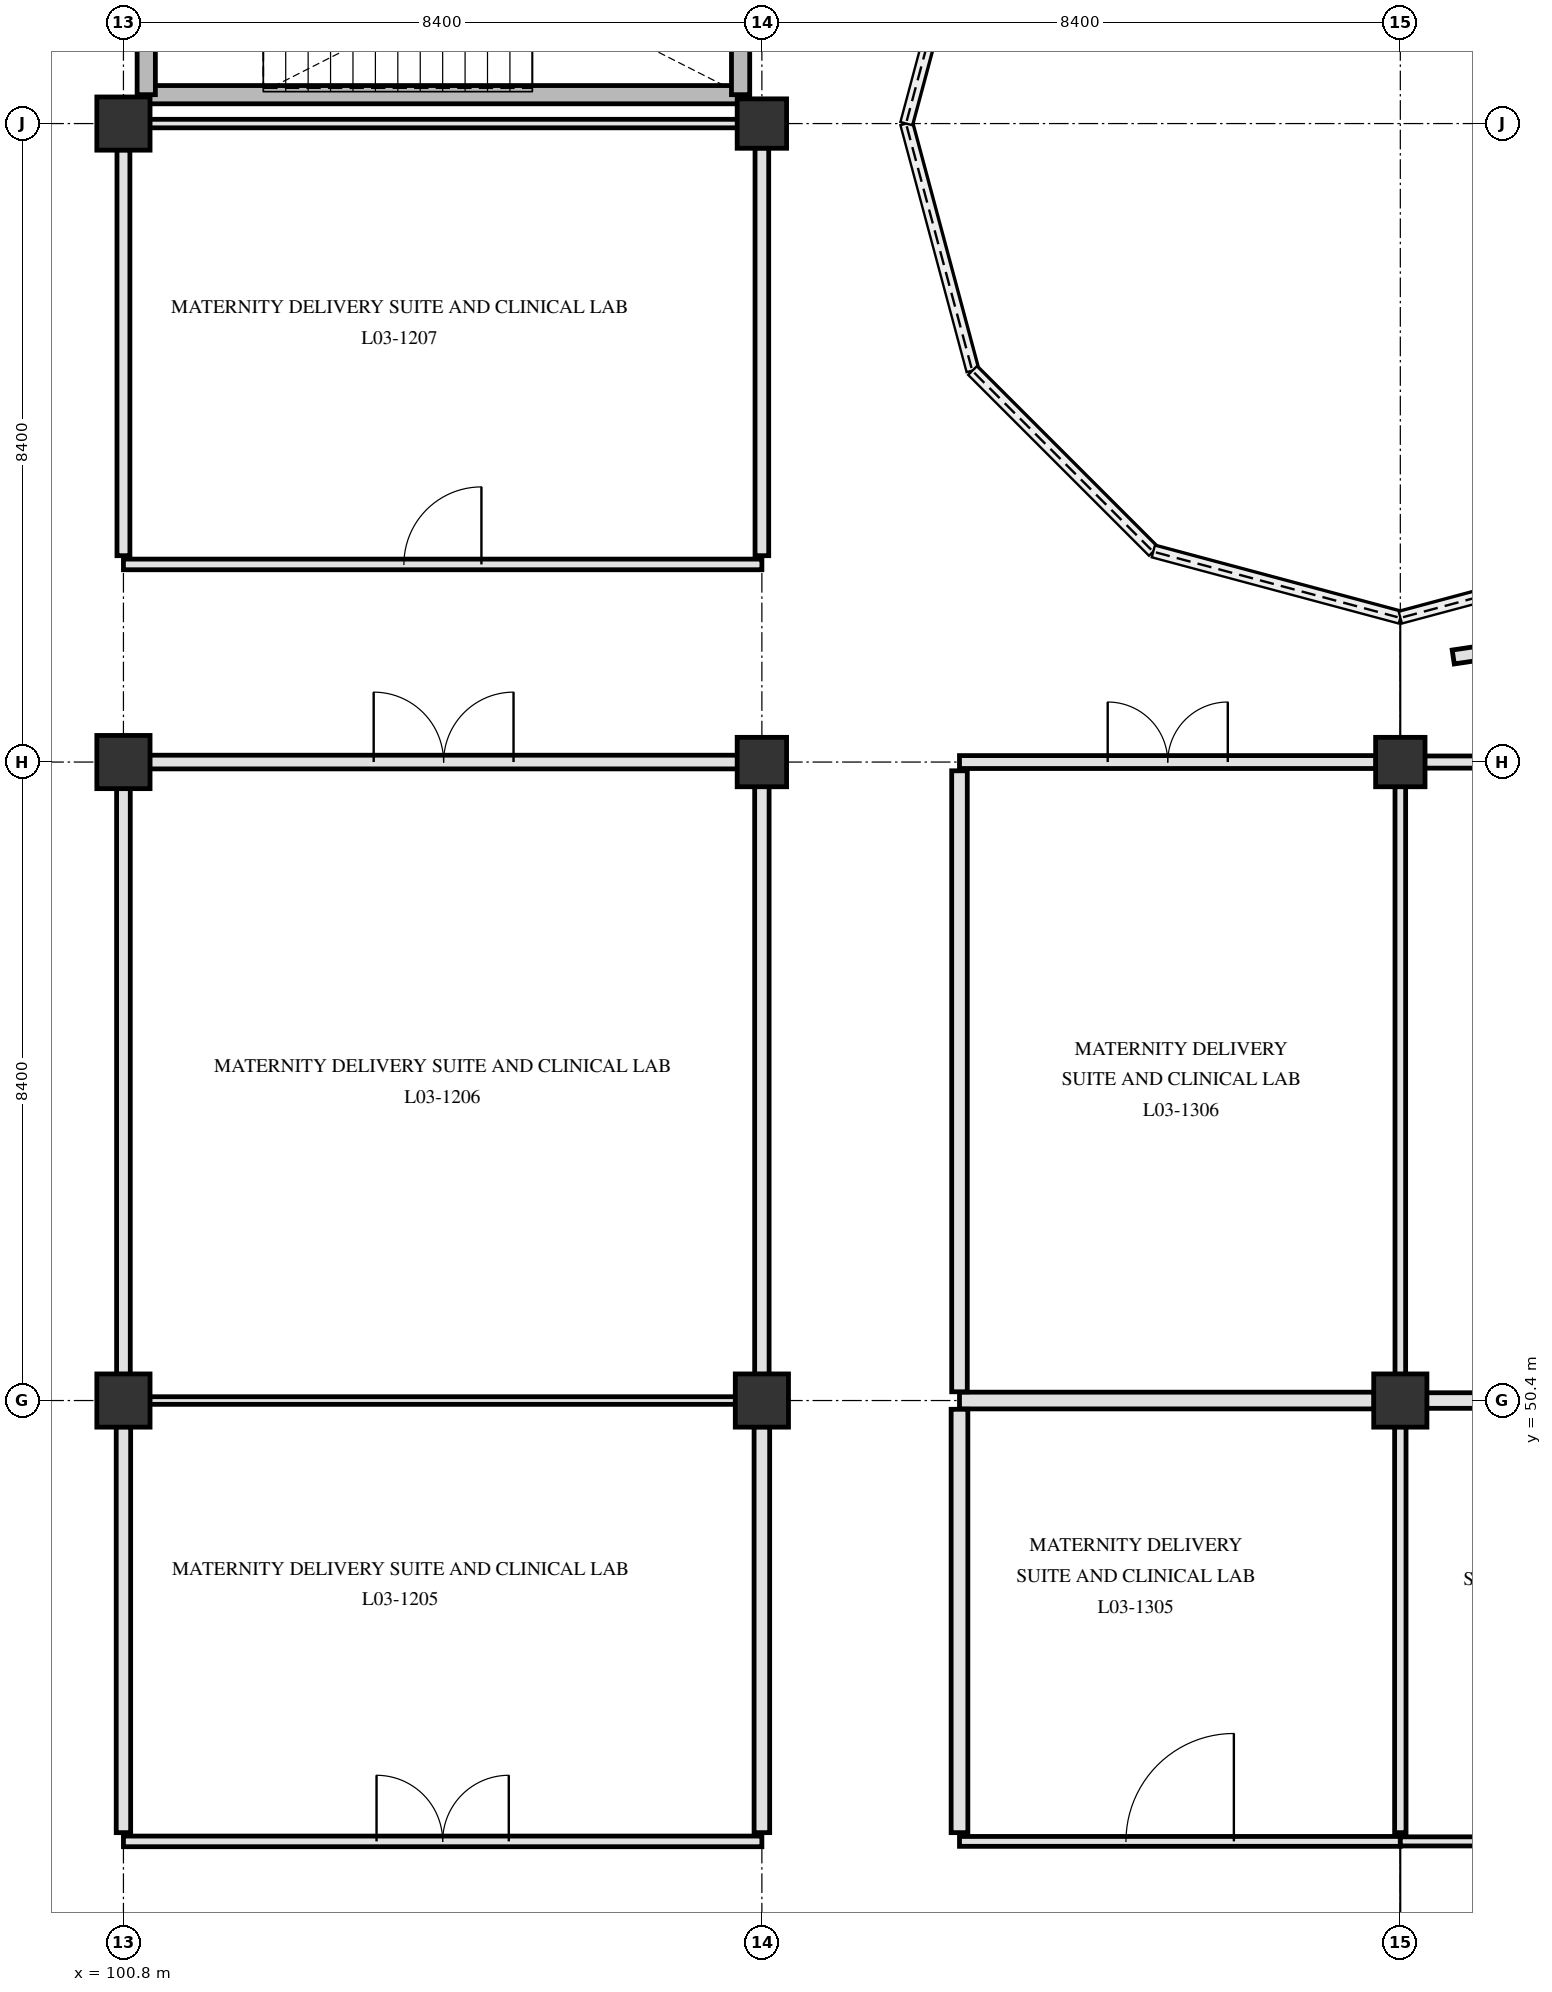
"""IFC4 building model, lengths in metres.
Left out: names, types, materials, properties, quantities, classifications, styles, units other than length and angle.
Written with IfcOpenShell. Run it as: python <this file> out.ifc"""

import sys

from ifc_helpers import new_model, si_unit, direction, frame, frame_2d, origin, origin_2d, place, context, subcontext, project, spatial, rectangle, circle, extrude, element, fill, save


model = new_model("IFC4")
c1 = context("Model", 3, precision=1e-05, world=origin(), true_north=direction((0.0, 1.0)))
c2 = subcontext(c1, "Body", "Model", "MODEL_VIEW")
j1 = project(units=[si_unit("LENGTHUNIT", "METRE"), si_unit("PLANEANGLEUNIT", "RADIAN")], contexts=[c1])
p1 = place(None, origin())
s1 = spatial("IfcSite", under=j1, at=p1, CompositionType="ELEMENT")
p2 = place(p1, origin())
s2 = spatial("IfcBuilding", under=s1, at=p2, CompositionType="ELEMENT")
p3 = place(p2, frame((0.0, 0.0, 14.4)))
s3 = spatial("IfcBuildingStorey", under=s2, at=p3, CompositionType="ELEMENT", Elevation=14.4)
for number, where, z_axis, x_axis in (
    (1, (100.8, 50.4, 0.0), (0.0, 0.0, 1.0), (1.0, 0.0, 0.0)),
    (2, (100.8, 58.8, 0.0), (0.0, 0.0, 1.0), (1.0, 0.0, 0.0)),
    (3, (100.8, 67.2, 0.0), (0.0, 0.0, 1.0), (1.0, 0.0, 0.0)),
    (4, (109.2, 50.4, 0.0), (0.0, 0.0, 1.0), (1.0, 0.0, 0.0)),
):
    element("IfcColumn", number, at=place(p3, frame(where, z_axis=z_axis, x_axis=x_axis)), inside=s3, PredefinedType="COLUMN", context=c2, shape_type="SweptSolid", body=[
        extrude(rectangle(XDim=0.7, YDim=0.7, at=origin_2d()), origin(), (0.0, 0.0, 1.0), 4.2),
    ])
for number, where, z_axis, x_axis in (
    (5, (109.2, 58.8, 0.0), (0.0, 0.0, 1.0), (1.0, 0.0, 0.0)),
    (6, (109.2, 67.2, 0.0), (0.0, 0.0, 1.0), (1.0, 0.0, 0.0)),
):
    element("IfcColumn", number, at=place(p3, frame(where, z_axis=z_axis, x_axis=x_axis)), inside=s3, PredefinedType="COLUMN", context=c2, shape_type="SweptSolid", body=[
        extrude(circle(Radius=0.325, at=origin_2d()), origin(), (0.0, 0.0, 1.0), 4.2),
    ])
p4 = place(p3, frame((117.6, 50.4, 0.0), z_axis=(0.0, 0.0, 1.0), x_axis=(1.0, 0.0, 0.0)))
e7 = element("IfcColumn", 7, at=p4, inside=s3, PredefinedType="COLUMN", context=c2, shape_type="SweptSolid", body=[
    extrude(rectangle(XDim=0.7, YDim=0.7, at=origin_2d()), origin(), (0.0, 0.0, 1.0), 4.2),
])
p5 = place(p3, frame((117.6, 58.8, 0.0), z_axis=(0.0, 0.0, 1.0), x_axis=(1.0, 0.0, 0.0)))
e8 = element("IfcColumn", 8, at=p5, inside=s3, PredefinedType="COLUMN", context=c2, shape_type="SweptSolid", body=[
    extrude(circle(Radius=0.325, at=origin_2d()), origin(), (0.0, 0.0, 1.0), 4.2),
])
p6 = place(p3, frame((118.296, 60.182, 4.18), z_axis=(0.0, 0.0, 1.0), x_axis=(0.989228428741, 0.14638003884, 0.0)))
e9 = element("IfcWall", 9, at=p6, inside=s3, PredefinedType="PARAPET", context=c2, shape_type="SweptSolid", body=[
    extrude(rectangle(XDim=0.682, YDim=0.185, at=frame_2d((0.341, 0.0))), origin(), (0.0, 0.0, 1.0), 1.17),
])
p7 = place(p3, frame((101.1, 67.58, 0.0), z_axis=(0.0, 0.0, 1.0), x_axis=(1.0, 0.0, 0.0)))
e10 = element("IfcWall", 10, at=p7, inside=s3, PredefinedType="SHEAR", context=c2, shape_type="SweptSolid", body=[
    extrude(rectangle(XDim=7.82, YDim=0.24, at=frame_2d((3.91, 0.0))), origin(), (0.0, 0.0, 1.0), 3.9),
])
for number, where, z_axis, x_axis in (
    (11, (101.1, 67.58, 0.0), (0.0, 0.0, 1.0), (0.0, 1.0, 0.0)),
    (12, (108.92, 67.58, 0.0), (0.0, 0.0, 1.0), (0.0, 1.0, 0.0)),
):
    element("IfcWall", number, at=place(p3, frame(where, z_axis=z_axis, x_axis=x_axis)), inside=s3, PredefinedType="SHEAR", context=c2, shape_type="SweptSolid", body=[
        extrude(rectangle(XDim=3.32, YDim=0.24, at=frame_2d((1.66, 0.0))), origin(), (0.0, 0.0, 1.0), 3.9),
    ])
p8 = place(p3, frame((100.8, 44.6, 0.0), z_axis=(0.0, 0.0, 1.0), x_axis=(1.0, 0.0, 0.0)))
e13 = element("IfcWall", 13, at=p8, inside=s3, PredefinedType="PARTITIONING", context=c2, shape_type="SweptSolid", body=[
    extrude(rectangle(XDim=8.4, YDim=0.14, at=frame_2d((4.2, 0.0))), origin(), (0.0, 0.0, 1.0), 2.69),
])
p9 = place(p8, frame((3.33, 0.0, 0.0)))
e14 = element("IfcOpeningElement", 14, at=p9, cuts=e13, PredefinedType="OPENING", context=c2, shape_type="SweptSolid", body=[
    extrude(rectangle(XDim=1.74, YDim=2.24, at=frame_2d((0.87, 1.12))), frame((0.0, 0.08, 0.0), z_axis=(0.0, -1.0, 0.0), x_axis=(1.0, 0.0, 0.0)), (0.0, 0.0, 1.0), 0.16),
])
p10 = place(p3, frame((111.8, 44.6, 0.0), z_axis=(0.0, 0.0, 1.0), x_axis=(1.0, 0.0, 0.0)))
e15 = element("IfcWall", 15, at=p10, inside=s3, PredefinedType="PARTITIONING", context=c2, shape_type="SweptSolid", body=[
    extrude(rectangle(XDim=5.8, YDim=0.13, at=frame_2d((2.9, 0.0))), origin(), (0.0, 0.0, 1.0), 3.34),
])
p11 = place(p10, frame((2.19, 0.0, 0.0)))
e16 = element("IfcOpeningElement", 16, at=p11, cuts=e15, PredefinedType="OPENING", context=c2, shape_type="SweptSolid", body=[
    extrude(rectangle(XDim=1.42, YDim=2.22, at=frame_2d((0.71, 1.11))), frame((0.0, 0.075, 0.0), z_axis=(0.0, -1.0, 0.0), x_axis=(1.0, 0.0, 0.0)), (0.0, 0.0, 1.0), 0.15),
])
p12 = place(p3, frame((117.6, 44.6, 0.0), z_axis=(0.0, 0.0, 1.0), x_axis=(1.0, 0.0, 0.0)))
e17 = element("IfcWall", 17, at=p12, inside=s3, PredefinedType="PARTITIONING", context=c2, shape_type="SweptSolid", body=[
    extrude(rectangle(XDim=8.017, YDim=0.12, at=frame_2d((4.009, 0.0))), origin(), (0.0, 0.0, 1.0), 3.34),
])
p13 = place(p12, frame((3.384, 0.0, 0.0)))
e18 = element("IfcOpeningElement", 18, at=p13, cuts=e17, PredefinedType="OPENING", context=c2, shape_type="SweptSolid", body=[
    extrude(rectangle(XDim=1.25, YDim=2.2, at=frame_2d((0.625, 1.1))), frame((0.0, 0.07, 0.0), z_axis=(0.0, -1.0, 0.0), x_axis=(1.0, 0.0, 0.0)), (0.0, 0.0, 1.0), 0.14),
])
p14 = place(p3, frame((101.145, 50.4, 0.0), z_axis=(0.0, 0.0, 1.0), x_axis=(1.0, 0.0, 0.0)))
e19 = element("IfcWall", 19, at=p14, inside=s3, PredefinedType="PARTITIONING", context=c2, shape_type="SweptSolid", body=[
    extrude(rectangle(XDim=7.71, YDim=0.1, at=frame_2d((3.855, 0.0))), origin(), (0.0, 0.0, 1.0), 3.29),
])
p15 = place(p3, frame((111.8, 50.4, 0.0), z_axis=(0.0, 0.0, 1.0), x_axis=(1.0, 0.0, 0.0)))
e20 = element("IfcWall", 20, at=p15, inside=s3, PredefinedType="PARTITIONING", context=c2, shape_type="SweptSolid", body=[
    extrude(rectangle(XDim=5.455, YDim=0.22, at=frame_2d((2.728, 0.0))), origin(), (0.0, 0.0, 1.0), 3.29),
])
p16 = place(p3, frame((117.945, 50.4, 0.0), z_axis=(0.0, 0.0, 1.0), x_axis=(1.0, 0.0, 0.0)))
e21 = element("IfcWall", 21, at=p16, inside=s3, PredefinedType="PARTITIONING", context=c2, shape_type="SweptSolid", body=[
    extrude(rectangle(XDim=7.672, YDim=0.205, at=frame_2d((3.836, 0.0))), origin(), (0.0, 0.0, 1.0), 3.29),
])
p17 = place(p3, frame((101.145, 58.8, 0.0), z_axis=(0.0, 0.0, 1.0), x_axis=(1.0, 0.0, 0.0)))
e22 = element("IfcWall", 22, at=p17, inside=s3, PredefinedType="PARTITIONING", context=c2, shape_type="SweptSolid", body=[
    extrude(rectangle(XDim=7.735, YDim=0.18, at=frame_2d((3.867, 0.0))), origin(), (0.0, 0.0, 1.0), 3.29),
])
p18 = place(p17, frame((2.948, 0.0, 0.0)))
e23 = element("IfcOpeningElement", 23, at=p18, cuts=e22, PredefinedType="OPENING", context=c2, shape_type="SweptSolid", body=[
    extrude(rectangle(XDim=1.84, YDim=2.28, at=frame_2d((0.92, 1.14))), frame((0.0, 0.1, 0.0), z_axis=(0.0, -1.0, 0.0), x_axis=(1.0, 0.0, 0.0)), (0.0, 0.0, 1.0), 0.2),
])
p19 = place(p3, frame((111.8, 58.8, 0.0), z_axis=(0.0, 0.0, 1.0), x_axis=(1.0, 0.0, 0.0)))
e24 = element("IfcWall", 24, at=p19, inside=s3, PredefinedType="PARTITIONING", context=c2, shape_type="SweptSolid", body=[
    extrude(rectangle(XDim=5.48, YDim=0.17, at=frame_2d((2.74, 0.0))), origin(), (0.0, 0.0, 1.0), 3.29),
])
p20 = place(p19, frame((1.95, 0.0, 0.0)))
e25 = element("IfcOpeningElement", 25, at=p20, cuts=e24, PredefinedType="OPENING", context=c2, shape_type="SweptSolid", body=[
    extrude(rectangle(XDim=1.58, YDim=2.22, at=frame_2d((0.79, 1.11))), frame((0.0, 0.095, 0.0), z_axis=(0.0, -1.0, 0.0), x_axis=(1.0, 0.0, 0.0)), (0.0, 0.0, 1.0), 0.19),
])
p21 = place(p3, frame((117.92, 58.8, 0.0), z_axis=(0.0, 0.0, 1.0), x_axis=(1.0, 0.0, 0.0)))
e26 = element("IfcWall", 26, at=p21, inside=s3, PredefinedType="PARTITIONING", context=c2, shape_type="SweptSolid", body=[
    extrude(rectangle(XDim=7.76, YDim=0.16, at=frame_2d((3.88, 0.0))), origin(), (0.0, 0.0, 1.0), 3.29),
])
p22 = place(p21, frame((3.23, 0.0, 0.0)))
e27 = element("IfcOpeningElement", 27, at=p22, cuts=e26, PredefinedType="OPENING", context=c2, shape_type="SweptSolid", body=[
    extrude(rectangle(XDim=1.3, YDim=2.2, at=frame_2d((0.65, 1.1))), frame((0.0, 0.09, 0.0), z_axis=(0.0, -1.0, 0.0), x_axis=(1.0, 0.0, 0.0)), (0.0, 0.0, 1.0), 0.18),
])
p23 = place(p3, frame((100.8, 61.4, 0.0), z_axis=(0.0, 0.0, 1.0), x_axis=(1.0, 0.0, 0.0)))
e28 = element("IfcWall", 28, at=p23, inside=s3, PredefinedType="PARTITIONING", context=c2, shape_type="SweptSolid", body=[
    extrude(rectangle(XDim=8.4, YDim=0.14, at=frame_2d((4.2, 0.0))), origin(), (0.0, 0.0, 1.0), 2.69),
])
p24 = place(p23, frame((3.69, 0.0, 0.0)))
e29 = element("IfcOpeningElement", 29, at=p24, cuts=e28, PredefinedType="OPENING", context=c2, shape_type="SweptSolid", body=[
    extrude(rectangle(XDim=1.02, YDim=2.12, at=frame_2d((0.51, 1.06))), frame((0.0, 0.08, 0.0), z_axis=(0.0, -1.0, 0.0), x_axis=(1.0, 0.0, 0.0)), (0.0, 0.0, 1.0), 0.16),
])
p25 = place(p3, frame((101.145, 67.2, 0.0), z_axis=(0.0, 0.0, 1.0), x_axis=(1.0, 0.0, 0.0)))
e30 = element("IfcWall", 30, at=p25, inside=s3, PredefinedType="PARTITIONING", context=c2, shape_type="SweptSolid", body=[
    extrude(rectangle(XDim=7.735, YDim=0.112, at=frame_2d((3.867, 0.0))), origin(), (0.0, 0.0, 1.0), 3.29),
])
p26 = place(p3, frame((100.8, 44.715, 0.0), z_axis=(0.0, 0.0, 1.0), x_axis=(0.0, 1.0, 0.0)))
e31 = element("IfcWall", 31, at=p26, inside=s3, PredefinedType="PARTITIONING", context=c2, shape_type="SweptSolid", body=[
    extrude(rectangle(XDim=5.34, YDim=0.19, at=frame_2d((2.67, 0.0))), origin(), (0.0, 0.0, 1.0), 2.69),
])
p27 = place(p3, frame((100.8, 50.745, 0.0), z_axis=(0.0, 0.0, 1.0), x_axis=(0.0, 1.0, 0.0)))
e32 = element("IfcWall", 32, at=p27, inside=s3, PredefinedType="PARTITIONING", context=c2, shape_type="SweptSolid", body=[
    extrude(rectangle(XDim=7.71, YDim=0.18, at=frame_2d((3.855, 0.0))), origin(), (0.0, 0.0, 1.0), 2.69),
])
p28 = place(p3, frame((100.8, 61.515, 0.0), z_axis=(0.0, 0.0, 1.0), x_axis=(0.0, 1.0, 0.0)))
e33 = element("IfcWall", 33, at=p28, inside=s3, PredefinedType="PARTITIONING", context=c2, shape_type="SweptSolid", body=[
    extrude(rectangle(XDim=5.34, YDim=0.17, at=frame_2d((2.67, 0.0))), origin(), (0.0, 0.0, 1.0), 2.69),
])
p29 = place(p3, frame((109.2, 44.715, 0.0), z_axis=(0.0, 0.0, 1.0), x_axis=(0.0, 1.0, 0.0)))
e34 = element("IfcWall", 34, at=p29, inside=s3, PredefinedType="PARTITIONING", context=c2, shape_type="SweptSolid", body=[
    extrude(rectangle(XDim=5.34, YDim=0.205, at=frame_2d((2.67, 0.0))), origin(), (0.0, 0.0, 1.0), 3.34),
])
p30 = place(p3, frame((109.2, 50.745, 0.0), z_axis=(0.0, 0.0, 1.0), x_axis=(0.0, 1.0, 0.0)))
e35 = element("IfcWall", 35, at=p30, inside=s3, PredefinedType="PARTITIONING", context=c2, shape_type="SweptSolid", body=[
    extrude(rectangle(XDim=7.735, YDim=0.19, at=frame_2d((3.867, 0.0))), origin(), (0.0, 0.0, 1.0), 3.34),
])
p31 = place(p3, frame((109.2, 61.515, 0.0), z_axis=(0.0, 0.0, 1.0), x_axis=(0.0, 1.0, 0.0)))
e36 = element("IfcWall", 36, at=p31, inside=s3, PredefinedType="PARTITIONING", context=c2, shape_type="SweptSolid", body=[
    extrude(rectangle(XDim=5.365, YDim=0.18, at=frame_2d((2.683, 0.0))), origin(), (0.0, 0.0, 1.0), 3.34),
])
p32 = place(p3, frame((111.8, 44.715, 0.0), z_axis=(0.0, 0.0, 1.0), x_axis=(0.0, 1.0, 0.0)))
e37 = element("IfcWall", 37, at=p32, inside=s3, PredefinedType="PARTITIONING", context=c2, shape_type="SweptSolid", body=[
    extrude(rectangle(XDim=5.57, YDim=0.22, at=frame_2d((2.785, 0.0))), origin(), (0.0, 0.0, 1.0), 3.29),
])
p33 = place(p3, frame((111.8, 50.515, 0.0), z_axis=(0.0, 0.0, 1.0), x_axis=(0.0, 1.0, 0.0)))
e38 = element("IfcWall", 38, at=p33, inside=s3, PredefinedType="PARTITIONING", context=c2, shape_type="SweptSolid", body=[
    extrude(rectangle(XDim=8.17, YDim=0.205, at=frame_2d((4.085, 0.0))), origin(), (0.0, 0.0, 1.0), 3.29),
])
p34 = place(p3, frame((117.6, 44.715, 0.0), z_axis=(0.0, 0.0, 1.0), x_axis=(0.0, 1.0, 0.0)))
e39 = element("IfcWall", 39, at=p34, inside=s3, PredefinedType="PARTITIONING", context=c2, shape_type="SweptSolid", body=[
    extrude(rectangle(XDim=5.34, YDim=0.15, at=frame_2d((2.67, 0.0))), origin(), (0.0, 0.0, 1.0), 3.34),
])
p35 = place(p3, frame((117.6, 50.745, 0.0), z_axis=(0.0, 0.0, 1.0), x_axis=(0.0, 1.0, 0.0)))
e40 = element("IfcWall", 40, at=p35, inside=s3, PredefinedType="PARTITIONING", context=c2, shape_type="SweptSolid", body=[
    extrude(rectangle(XDim=7.735, YDim=0.14, at=frame_2d((3.867, 0.0))), origin(), (0.0, 0.0, 1.0), 3.34),
])
p36 = place(p9, origin())
e41 = element("IfcDoor", 41, at=p36, inside=s3, OperationType="DOUBLE_SWING_RIGHT", PredefinedType="DOOR", context=c2, shape_type="SweptSolid", body=[
    extrude(rectangle(XDim=1.74, YDim=2.24, at=frame_2d((0.87, 1.12))), frame((0.0, 0.025, 0.0), z_axis=(0.0, -1.0, 0.0), x_axis=(1.0, 0.0, 0.0)), (0.0, 0.0, 1.0), 0.05),
])
fill(e14, e41)
p37 = place(p18, origin())
e42 = element("IfcDoor", 42, at=p37, inside=s3, OperationType="DOUBLE_SWING_LEFT", PredefinedType="DOOR", context=c2, shape_type="SweptSolid", body=[
    extrude(rectangle(XDim=1.84, YDim=2.28, at=frame_2d((0.92, 1.14))), frame((0.0, 0.025, 0.0), z_axis=(0.0, -1.0, 0.0), x_axis=(1.0, 0.0, 0.0)), (0.0, 0.0, 1.0), 0.05),
])
fill(e23, e42)
p38 = place(p24, origin())
e43 = element("IfcDoor", 43, at=p38, inside=s3, OperationType="SINGLE_SWING_RIGHT", PredefinedType="DOOR", context=c2, shape_type="SweptSolid", body=[
    extrude(rectangle(XDim=1.02, YDim=2.12, at=frame_2d((0.51, 1.06))), frame((0.0, 0.025, 0.0), z_axis=(0.0, -1.0, 0.0), x_axis=(1.0, 0.0, 0.0)), (0.0, 0.0, 1.0), 0.05),
])
fill(e29, e43)
p39 = place(p11, origin())
e44 = element("IfcDoor", 44, at=p39, inside=s3, OperationType="SINGLE_SWING_RIGHT", PredefinedType="DOOR", context=c2, shape_type="SweptSolid", body=[
    extrude(rectangle(XDim=1.42, YDim=2.22, at=frame_2d((0.71, 1.11))), frame((0.0, 0.025, 0.0), z_axis=(0.0, -1.0, 0.0), x_axis=(1.0, 0.0, 0.0)), (0.0, 0.0, 1.0), 0.05),
])
fill(e16, e44)
p40 = place(p20, origin())
e45 = element("IfcDoor", 45, at=p40, inside=s3, OperationType="DOUBLE_SWING_LEFT", PredefinedType="DOOR", context=c2, shape_type="SweptSolid", body=[
    extrude(rectangle(XDim=1.58, YDim=2.22, at=frame_2d((0.79, 1.11))), frame((0.0, 0.025, 0.0), z_axis=(0.0, -1.0, 0.0), x_axis=(1.0, 0.0, 0.0)), (0.0, 0.0, 1.0), 0.05),
])
fill(e25, e45)
save(model, sys.argv[1])
